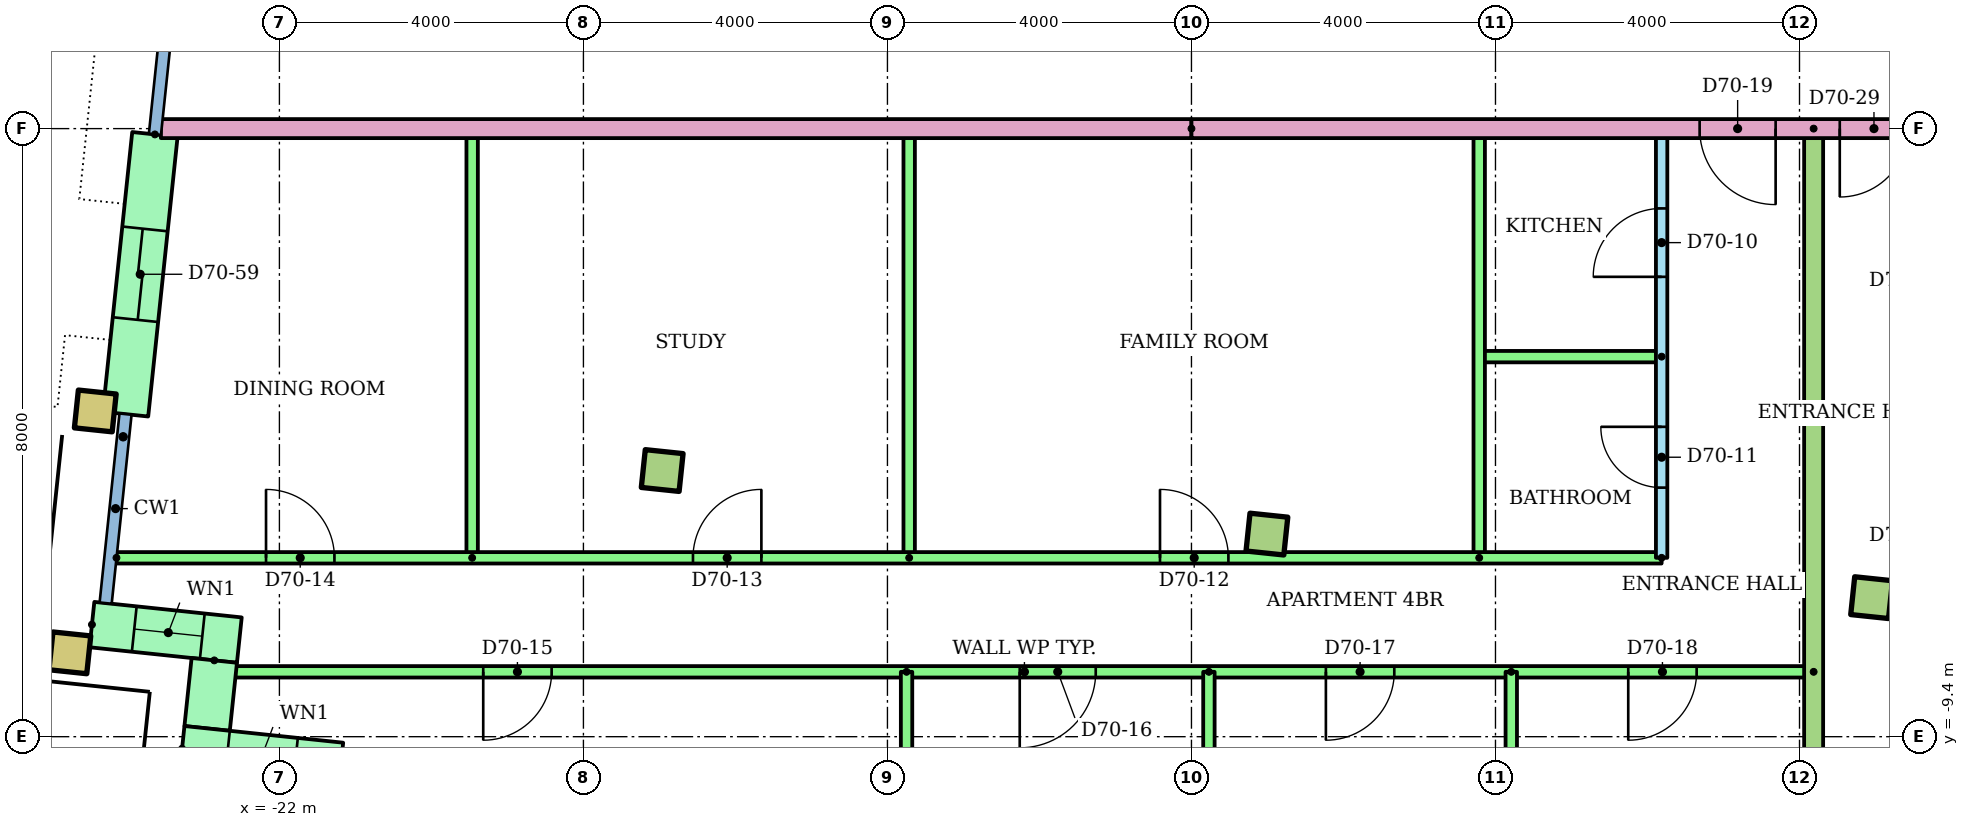
"""IFC4 building model, lengths in metres.
Left out: names, types, materials, properties, quantities, classifications, styles, units other than length and angle.
Written with IfcOpenShell. Run it as: python <this file> out.ifc"""

import sys

from ifc_helpers import new_model, si_unit, direction, frame, frame_2d, origin, origin_2d, place, context, subcontext, project, spatial, rectangle, hollow_rectangle, extrude, element, fill, save


model = new_model("IFC4")
c1 = context("Model", 3, precision=1e-05, world=origin(), true_north=direction((0.0, 1.0)))
c2 = subcontext(c1, "Body", "Model", "MODEL_VIEW")
j1 = project(units=[si_unit("LENGTHUNIT", "METRE"), si_unit("PLANEANGLEUNIT", "RADIAN")], contexts=[c1])
p1 = place(None, origin())
s1 = spatial("IfcSite", under=j1, at=p1, CompositionType="ELEMENT")
p2 = place(p1, origin())
s2 = spatial("IfcBuilding", under=s1, at=p2, CompositionType="ELEMENT")
p3 = place(p2, frame((0.0, 0.0, 269.1)))
s3 = spatial("IfcBuildingStorey", under=s2, at=p3, CompositionType="ELEMENT", Elevation=269.1)
for number, where, z_axis, x_axis in (
    (1, (-24.757, -8.297, 0.0), (0.0, 0.0, 1.0), (0.995, -0.105, 0.0)),
    (2, (-24.423, -5.115, 0.0), (0.0, 0.0, 1.0), (0.995, -0.105, 0.0)),
):
    element("IfcColumn", number, at=place(p3, frame(where, z_axis=z_axis, x_axis=x_axis)), inside=s3, PredefinedType="COLUMN", context=c2, shape_type="SweptSolid", body=[
        extrude(hollow_rectangle(XDim=0.5, YDim=0.5, WallThickness=0.025, at=origin_2d()), origin(), (0.0, 0.0, 1.0), 3.2),
    ])
for number, where, z_axis, x_axis in (
    (3, (-16.964, -5.898, 0.0), (0.0, 0.0, 1.0), (0.995, -0.105, 0.0)),
    (4, (-9.007, -6.735, 0.0), (0.0, 0.0, 1.0), (0.995, -0.105, 0.0)),
    (5, (-1.051, -7.571, 0.0), (0.0, 0.0, 1.0), (0.995, -0.105, 0.0)),
):
    element("IfcColumn", number, at=place(p3, frame(where, z_axis=z_axis, x_axis=x_axis)), inside=s3, PredefinedType="COLUMN", context=c2, shape_type="SweptSolid", body=[
        extrude(rectangle(XDim=0.5, YDim=0.5, at=origin_2d()), origin(), (0.0, 0.0, 1.0), 3.2),
    ])
p4 = place(p3, frame((-23.638, -1.476, 0.0), z_axis=(0.0, 0.0, 1.0), x_axis=(-0.104513052986, -0.994523514933, 0.0)))
e6 = element("IfcWall", 6, at=p4, inside=s3, PredefinedType="STANDARD", context=c2, shape_type="SweptSolid", body=[
    extrude(rectangle(XDim=3.7, YDim=0.6, at=frame_2d((1.85, 0.0))), origin(), (0.0, 0.0, 1.0), 2.92),
])
p5 = place(p4, frame((1.25, 0.0, 0.0)))
e7 = element("IfcOpeningElement", 7, at=p5, cuts=e6, PredefinedType="OPENING", context=c2, shape_type="SweptSolid", body=[
    extrude(rectangle(XDim=1.2, YDim=2.1, at=frame_2d((0.6, 1.05))), frame((0.0, 0.31, 0.0), z_axis=(0.0, -1.0, 0.0), x_axis=(1.0, 0.0, 0.0)), (0.0, 0.0, 1.0), 0.62),
])
p6 = place(p3, frame((-24.467, -7.925, 0.0), z_axis=(0.0, 0.0, 1.0), x_axis=(0.994521219184, -0.104534896528, 0.0)))
e8 = element("IfcWall", 8, at=p6, inside=s3, PredefinedType="STANDARD", context=c2, shape_type="SweptSolid", body=[
    extrude(rectangle(XDim=1.95, YDim=0.6, at=frame_2d((0.975, 0.0))), origin(), (0.0, 0.0, 1.0), 2.92),
])
p7 = place(p6, frame((0.56, 0.0, 0.9)))
e9 = element("IfcOpeningElement", 9, at=p7, cuts=e8, PredefinedType="OPENING", context=c2, shape_type="SweptSolid", body=[
    extrude(rectangle(XDim=0.9, YDim=1.5, at=frame_2d((0.45, 0.75))), frame((0.0, 0.31, 0.0), z_axis=(0.0, -1.0, 0.0), x_axis=(1.0, 0.0, 0.0)), (0.0, 0.0, 1.0), 0.62),
])
p8 = place(p3, frame((-22.857, -8.396, 0.0), z_axis=(0.0, 0.0, 1.0), x_axis=(-0.104444712852, -0.994530694326, 0.0)))
e10 = element("IfcWall", 10, at=p8, inside=s3, PredefinedType="STANDARD", context=c2, shape_type="SweptSolid", body=[
    extrude(rectangle(XDim=0.9, YDim=0.6, at=frame_2d((0.45, 0.0))), origin(), (0.0, 0.0, 1.0), 2.92),
])
p9 = place(p3, frame((-23.281, -9.558, 0.0), z_axis=(0.0, 0.0, 1.0), x_axis=(0.994523910136, -0.104509292252, 0.0)))
e11 = element("IfcWall", 11, at=p9, inside=s3, PredefinedType="STANDARD", context=c2, shape_type="SweptSolid", body=[
    extrude(rectangle(XDim=2.1, YDim=0.6, at=frame_2d((1.05, 0.0))), origin(), (0.0, 0.0, 1.0), 2.92),
])
p10 = place(p9, frame((0.6, 0.0, 0.9)))
e12 = element("IfcOpeningElement", 12, at=p10, cuts=e11, PredefinedType="OPENING", context=c2, shape_type="SweptSolid", body=[
    extrude(rectangle(XDim=0.9, YDim=1.5, at=frame_2d((0.45, 0.75))), frame((0.0, 0.31, 0.0), z_axis=(0.0, -1.0, 0.0), x_axis=(1.0, 0.0, 0.0)), (0.0, 0.0, 1.0), 0.62),
])
p11 = place(p3, frame((-3.814, -7.047, 0.0), z_axis=(0.0, 0.0, 1.0), x_axis=(0.0, 1.0, 0.0)))
e13 = element("IfcWall", 13, at=p11, inside=s3, PredefinedType="PARTITIONING", context=c2, shape_type="SweptSolid", body=[
    extrude(rectangle(XDim=5.647, YDim=0.15, at=frame_2d((2.823, 0.0))), origin(), (0.0, 0.0, 1.0), 2.4),
])
p12 = place(p11, frame((3.697, 0.0, 0.0)))
e14 = element("IfcOpeningElement", 14, at=p12, cuts=e13, PredefinedType="OPENING", context=c2, shape_type="SweptSolid", body=[
    extrude(rectangle(XDim=0.9, YDim=2.1, at=frame_2d((0.45, 1.05))), frame((0.0, 0.085, 0.0), z_axis=(0.0, -1.0, 0.0), x_axis=(1.0, 0.0, 0.0)), (0.0, 0.0, 1.0), 0.17),
])
p13 = place(p11, frame((0.923, 0.0, 0.0)))
e15 = element("IfcOpeningElement", 15, at=p13, cuts=e13, PredefinedType="OPENING", context=c2, shape_type="SweptSolid", body=[
    extrude(rectangle(XDim=0.8, YDim=2.1, at=frame_2d((0.4, 1.05))), frame((0.0, 0.085, 0.0), z_axis=(0.0, -1.0, 0.0), x_axis=(1.0, 0.0, 0.0)), (0.0, 0.0, 1.0), 0.17),
])
p14 = place(p3, frame((-3.814, -4.4, 0.0), z_axis=(0.0, 0.0, 1.0), x_axis=(-1.0, 0.0, 0.0)))
e16 = element("IfcWall", 16, at=p14, inside=s3, PredefinedType="PARTITIONING", context=c2, shape_type="SweptSolid", body=[
    extrude(rectangle(XDim=2.4, YDim=0.15, at=frame_2d((1.2, 0.0))), origin(), (0.0, 0.0, 1.0), 2.4),
])
for number, where, z_axis, x_axis in (
    (17, (-6.214, -7.047, 0.0), (0.0, 0.0, 1.0), (0.0, 1.0, 0.0)),
    (18, (-13.714, -7.047, 0.0), (0.0, 0.0, 1.0), (0.0, 1.0, 0.0)),
    (19, (-19.464, -7.047, 0.0), (0.0, 0.0, 1.0), (0.0, 1.0, 0.0)),
):
    element("IfcWall", number, at=place(p3, frame(where, z_axis=z_axis, x_axis=x_axis)), inside=s3, PredefinedType="PARTITIONING", context=c2, shape_type="SweptSolid", body=[
        extrude(rectangle(XDim=5.647, YDim=0.15, at=frame_2d((2.823, 0.0))), origin(), (0.0, 0.0, 1.0), 2.4),
    ])
p15 = place(p3, frame((-24.144, -7.047, 0.0)))
e20 = element("IfcWall", 20, at=p15, inside=s3, PredefinedType="PARTITIONING", context=c2, shape_type="SweptSolid", body=[
    extrude(rectangle(XDim=20.33, YDim=0.15, at=frame_2d((10.165, 0.0))), origin(), (0.0, 0.0, 1.0), 2.4),
])
p16 = place(p15, frame((13.73, 0.0, 0.0)))
e21 = element("IfcOpeningElement", 21, at=p16, cuts=e20, PredefinedType="OPENING", context=c2, shape_type="SweptSolid", body=[
    extrude(rectangle(XDim=0.9, YDim=2.1, at=frame_2d((0.45, 1.05))), frame((0.0, 0.085, 0.0), z_axis=(0.0, -1.0, 0.0), x_axis=(1.0, 0.0, 0.0)), (0.0, 0.0, 1.0), 0.17),
])
p17 = place(p15, frame((7.585, 0.0, 0.0)))
e22 = element("IfcOpeningElement", 22, at=p17, cuts=e20, PredefinedType="OPENING", context=c2, shape_type="SweptSolid", body=[
    extrude(rectangle(XDim=0.9, YDim=2.1, at=frame_2d((0.45, 1.05))), frame((0.0, 0.085, 0.0), z_axis=(0.0, -1.0, 0.0), x_axis=(1.0, 0.0, 0.0)), (0.0, 0.0, 1.0), 0.17),
])
p18 = place(p15, frame((1.968, 0.0, 0.0)))
e23 = element("IfcOpeningElement", 23, at=p18, cuts=e20, PredefinedType="OPENING", context=c2, shape_type="SweptSolid", body=[
    extrude(rectangle(XDim=0.9, YDim=2.1, at=frame_2d((0.45, 1.05))), frame((0.0, 0.085, 0.0), z_axis=(0.0, -1.0, 0.0), x_axis=(1.0, 0.0, 0.0)), (0.0, 0.0, 1.0), 0.17),
])
p19 = place(p3, frame((-1.814, -8.547, 0.0), z_axis=(0.0, 0.0, 1.0), x_axis=(-1.0, 0.0, 0.0)))
e24 = element("IfcWall", 24, at=p19, inside=s3, PredefinedType="PARTITIONING", context=c2, shape_type="SweptSolid", body=[
    extrude(rectangle(XDim=20.767, YDim=0.15, at=frame_2d((10.384, 0.0))), origin(), (0.0, 0.0, 1.0), 2.4),
])
p20 = place(p19, frame((16.604, 0.0, 0.0)))
e25 = element("IfcOpeningElement", 25, at=p20, cuts=e24, PredefinedType="OPENING", context=c2, shape_type="SweptSolid", body=[
    extrude(rectangle(XDim=0.9, YDim=2.1, at=frame_2d((0.45, 1.05))), frame((0.0, 0.085, 0.0), z_axis=(0.0, -1.0, 0.0), x_axis=(1.0, 0.0, 0.0)), (0.0, 0.0, 1.0), 0.17),
])
p21 = place(p19, frame((9.446, 0.0, 0.0)))
e26 = element("IfcOpeningElement", 26, at=p21, cuts=e24, PredefinedType="OPENING", context=c2, shape_type="SweptSolid", body=[
    extrude(rectangle(XDim=1.0, YDim=2.1, at=frame_2d((0.5, 1.05))), frame((0.0, 0.085, 0.0), z_axis=(0.0, -1.0, 0.0), x_axis=(1.0, 0.0, 0.0)), (0.0, 0.0, 1.0), 0.17),
])
p22 = place(p19, frame((5.517, 0.0, 0.0)))
e27 = element("IfcOpeningElement", 27, at=p22, cuts=e24, PredefinedType="OPENING", context=c2, shape_type="SweptSolid", body=[
    extrude(rectangle(XDim=0.9, YDim=2.1, at=frame_2d((0.45, 1.05))), frame((0.0, 0.085, 0.0), z_axis=(0.0, -1.0, 0.0), x_axis=(1.0, 0.0, 0.0)), (0.0, 0.0, 1.0), 0.17),
])
p23 = place(p19, frame((1.539, 0.0, 0.0)))
e28 = element("IfcOpeningElement", 28, at=p23, cuts=e24, PredefinedType="OPENING", context=c2, shape_type="SweptSolid", body=[
    extrude(rectangle(XDim=0.9, YDim=2.1, at=frame_2d((0.45, 1.05))), frame((0.0, 0.085, 0.0), z_axis=(0.0, -1.0, 0.0), x_axis=(1.0, 0.0, 0.0)), (0.0, 0.0, 1.0), 0.17),
])
p24 = place(p3, frame((-13.749, -8.547, 0.0), z_axis=(0.0, 0.0, 1.0), x_axis=(0.0, -1.0, 0.0)))
e29 = element("IfcWall", 29, at=p24, inside=s3, PredefinedType="PARTITIONING", context=c2, shape_type="SweptSolid", body=[
    extrude(rectangle(XDim=4.95, YDim=0.15, at=frame_2d((2.475, 0.0))), origin(), (0.0, 0.0, 1.0), 2.4),
])
p25 = place(p3, frame((-9.771, -8.547, 0.0), z_axis=(0.0, 0.0, 1.0), x_axis=(0.0, -1.0, 0.0)))
e30 = element("IfcWall", 30, at=p25, inside=s3, PredefinedType="PARTITIONING", context=c2, shape_type="SweptSolid", body=[
    extrude(rectangle(XDim=5.358, YDim=0.15, at=frame_2d((2.679, 0.0))), origin(), (0.0, 0.0, 1.0), 2.4),
])
p26 = place(p3, frame((-5.792, -8.547, 0.0), z_axis=(0.0, 0.0, 1.0), x_axis=(0.0, -1.0, 0.0)))
e31 = element("IfcWall", 31, at=p26, inside=s3, PredefinedType="PARTITIONING", context=c2, shape_type="SweptSolid", body=[
    extrude(rectangle(XDim=5.787, YDim=0.15, at=frame_2d((2.893, 0.0))), origin(), (0.0, 0.0, 1.0), 2.4),
])
p27 = place(p3, frame((-1.814, -1.4, 0.0), z_axis=(0.0, 0.0, 1.0), x_axis=(0.0, -1.0, 0.0)))
e32 = element("IfcWall", 32, at=p27, inside=s3, PredefinedType="PARTITIONING", context=c2, shape_type="SweptSolid", body=[
    extrude(rectangle(XDim=13.341, YDim=0.25, at=frame_2d((6.67, 0.0))), origin(), (0.0, 0.0, 1.0), 2.4),
])
p28 = place(p3, frame((-10.0, -1.4, 0.0), z_axis=(0.0, 0.0, 1.0), x_axis=(-1.0, 0.0, 0.0)))
e33 = element("IfcWall", 33, at=p28, inside=s3, PredefinedType="PARTITIONING", context=c2, shape_type="SweptSolid", body=[
    extrude(rectangle(XDim=13.56, YDim=0.25, at=frame_2d((6.78, 0.0))), origin(), (0.0, 0.0, 1.0), 2.4),
])
p29 = place(p3, frame((10.0, -1.4, 0.0), z_axis=(0.0, 0.0, 1.0), x_axis=(-1.0, 0.0, 0.0)))
e34 = element("IfcWall", 34, at=p29, inside=s3, PredefinedType="PARTITIONING", context=c2, shape_type="SweptSolid", body=[
    extrude(rectangle(XDim=20.0, YDim=0.25, at=frame_2d((10.0, 0.0))), origin(), (0.0, 0.0, 1.0), 2.4),
])
p30 = place(p29, frame((12.314, 0.0, 0.0)))
e35 = element("IfcOpeningElement", 35, at=p30, cuts=e34, PredefinedType="OPENING", context=c2, shape_type="SweptSolid", body=[
    extrude(rectangle(XDim=1.0, YDim=2.1, at=frame_2d((0.5, 1.05))), frame((0.0, 0.135, 0.0), z_axis=(0.0, -1.0, 0.0), x_axis=(1.0, 0.0, 0.0)), (0.0, 0.0, 1.0), 0.27),
])
p31 = place(p29, frame((10.57, 0.0, 0.0)))
e36 = element("IfcOpeningElement", 36, at=p31, cuts=e34, PredefinedType="OPENING", context=c2, shape_type="SweptSolid", body=[
    extrude(rectangle(XDim=0.9, YDim=2.1, at=frame_2d((0.45, 1.05))), frame((0.0, 0.135, 0.0), z_axis=(0.0, -1.0, 0.0), x_axis=(1.0, 0.0, 0.0)), (0.0, 0.0, 1.0), 0.27),
])
p32 = place(p7, origin())
e37 = element("IfcWindow", 37, at=p32, inside=s3, PartitioningType="SINGLE_PANEL", PredefinedType="WINDOW", context=c2, shape_type="SweptSolid", body=[
    extrude(rectangle(XDim=0.9, YDim=1.5, at=frame_2d((0.45, 0.75))), frame((0.0, 0.03, 0.0), z_axis=(0.0, -1.0, 0.0), x_axis=(1.0, 0.0, 0.0)), (0.0, 0.0, 1.0), 0.06),
])
fill(e9, e37)
p33 = place(p12, origin())
e38 = element("IfcDoor", 38, at=p33, inside=s3, OperationType="SINGLE_SWING_LEFT", PredefinedType="DOOR", context=c2, shape_type="SweptSolid", body=[
    extrude(rectangle(XDim=0.9, YDim=2.1, at=frame_2d((0.45, 1.05))), frame((0.0, 0.025, 0.0), z_axis=(0.0, -1.0, 0.0), x_axis=(1.0, 0.0, 0.0)), (0.0, 0.0, 1.0), 0.05),
])
fill(e14, e38)
p34 = place(p13, origin())
e39 = element("IfcDoor", 39, at=p34, inside=s3, OperationType="SINGLE_SWING_RIGHT", PredefinedType="DOOR", context=c2, shape_type="SweptSolid", body=[
    extrude(rectangle(XDim=0.8, YDim=2.1, at=frame_2d((0.4, 1.05))), frame((0.0, 0.025, 0.0), z_axis=(0.0, -1.0, 0.0), x_axis=(1.0, 0.0, 0.0)), (0.0, 0.0, 1.0), 0.05),
])
fill(e15, e39)
p35 = place(p16, origin())
e40 = element("IfcDoor", 40, at=p35, inside=s3, OperationType="SINGLE_SWING_LEFT", PredefinedType="DOOR", context=c2, shape_type="SweptSolid", body=[
    extrude(rectangle(XDim=0.9, YDim=2.1, at=frame_2d((0.45, 1.05))), frame((0.0, 0.025, 0.0), z_axis=(0.0, -1.0, 0.0), x_axis=(1.0, 0.0, 0.0)), (0.0, 0.0, 1.0), 0.05),
])
fill(e21, e40)
p36 = place(p17, origin())
e41 = element("IfcDoor", 41, at=p36, inside=s3, OperationType="SINGLE_SWING_RIGHT", PredefinedType="DOOR", context=c2, shape_type="SweptSolid", body=[
    extrude(rectangle(XDim=0.9, YDim=2.1, at=frame_2d((0.45, 1.05))), frame((0.0, 0.025, 0.0), z_axis=(0.0, -1.0, 0.0), x_axis=(1.0, 0.0, 0.0)), (0.0, 0.0, 1.0), 0.05),
])
fill(e22, e41)
p37 = place(p18, origin())
e42 = element("IfcDoor", 42, at=p37, inside=s3, OperationType="SINGLE_SWING_LEFT", PredefinedType="DOOR", context=c2, shape_type="SweptSolid", body=[
    extrude(rectangle(XDim=0.9, YDim=2.1, at=frame_2d((0.45, 1.05))), frame((0.0, 0.025, 0.0), z_axis=(0.0, -1.0, 0.0), x_axis=(1.0, 0.0, 0.0)), (0.0, 0.0, 1.0), 0.05),
])
fill(e23, e42)
p38 = place(p20, origin())
e43 = element("IfcDoor", 43, at=p38, inside=s3, OperationType="SINGLE_SWING_RIGHT", PredefinedType="DOOR", context=c2, shape_type="SweptSolid", body=[
    extrude(rectangle(XDim=0.9, YDim=2.1, at=frame_2d((0.45, 1.05))), frame((0.0, 0.025, 0.0), z_axis=(0.0, -1.0, 0.0), x_axis=(1.0, 0.0, 0.0)), (0.0, 0.0, 1.0), 0.05),
])
fill(e25, e43)
p39 = place(p21, origin())
e44 = element("IfcDoor", 44, at=p39, inside=s3, OperationType="SINGLE_SWING_RIGHT", PredefinedType="DOOR", context=c2, shape_type="SweptSolid", body=[
    extrude(rectangle(XDim=1.0, YDim=2.1, at=frame_2d((0.5, 1.05))), frame((0.0, 0.025, 0.0), z_axis=(0.0, -1.0, 0.0), x_axis=(1.0, 0.0, 0.0)), (0.0, 0.0, 1.0), 0.05),
])
fill(e26, e44)
p40 = place(p22, origin())
e45 = element("IfcDoor", 45, at=p40, inside=s3, OperationType="SINGLE_SWING_RIGHT", PredefinedType="DOOR", context=c2, shape_type="SweptSolid", body=[
    extrude(rectangle(XDim=0.9, YDim=2.1, at=frame_2d((0.45, 1.05))), frame((0.0, 0.025, 0.0), z_axis=(0.0, -1.0, 0.0), x_axis=(1.0, 0.0, 0.0)), (0.0, 0.0, 1.0), 0.05),
])
fill(e27, e45)
p41 = place(p23, origin())
e46 = element("IfcDoor", 46, at=p41, inside=s3, OperationType="SINGLE_SWING_RIGHT", PredefinedType="DOOR", context=c2, shape_type="SweptSolid", body=[
    extrude(rectangle(XDim=0.9, YDim=2.1, at=frame_2d((0.45, 1.05))), frame((0.0, 0.025, 0.0), z_axis=(0.0, -1.0, 0.0), x_axis=(1.0, 0.0, 0.0)), (0.0, 0.0, 1.0), 0.05),
])
fill(e28, e46)
p42 = place(p30, origin())
e47 = element("IfcDoor", 47, at=p42, inside=s3, OperationType="SINGLE_SWING_LEFT", PredefinedType="DOOR", context=c2, shape_type="SweptSolid", body=[
    extrude(rectangle(XDim=1.0, YDim=2.1, at=frame_2d((0.5, 1.05))), frame((0.0, 0.025, 0.0), z_axis=(0.0, -1.0, 0.0), x_axis=(1.0, 0.0, 0.0)), (0.0, 0.0, 1.0), 0.05),
])
fill(e35, e47)
p43 = place(p31, origin())
e48 = element("IfcDoor", 48, at=p43, inside=s3, OperationType="SINGLE_SWING_RIGHT", PredefinedType="DOOR", context=c2, shape_type="SweptSolid", body=[
    extrude(rectangle(XDim=0.9, YDim=2.1, at=frame_2d((0.45, 1.05))), frame((0.0, 0.025, 0.0), z_axis=(0.0, -1.0, 0.0), x_axis=(1.0, 0.0, 0.0)), (0.0, 0.0, 1.0), 0.05),
])
fill(e36, e48)
p44 = place(p5, origin())
e49 = element("IfcDoor", 49, at=p44, inside=s3, OperationType="SLIDING_TO_LEFT", PredefinedType="DOOR", context=c2, shape_type="SweptSolid", body=[
    extrude(rectangle(XDim=1.2, YDim=2.1, at=frame_2d((0.6, 1.05))), frame((0.0, 0.025, 0.0), z_axis=(0.0, -1.0, 0.0), x_axis=(1.0, 0.0, 0.0)), (0.0, 0.0, 1.0), 0.05),
])
fill(e7, e49)
save(model, sys.argv[1])
